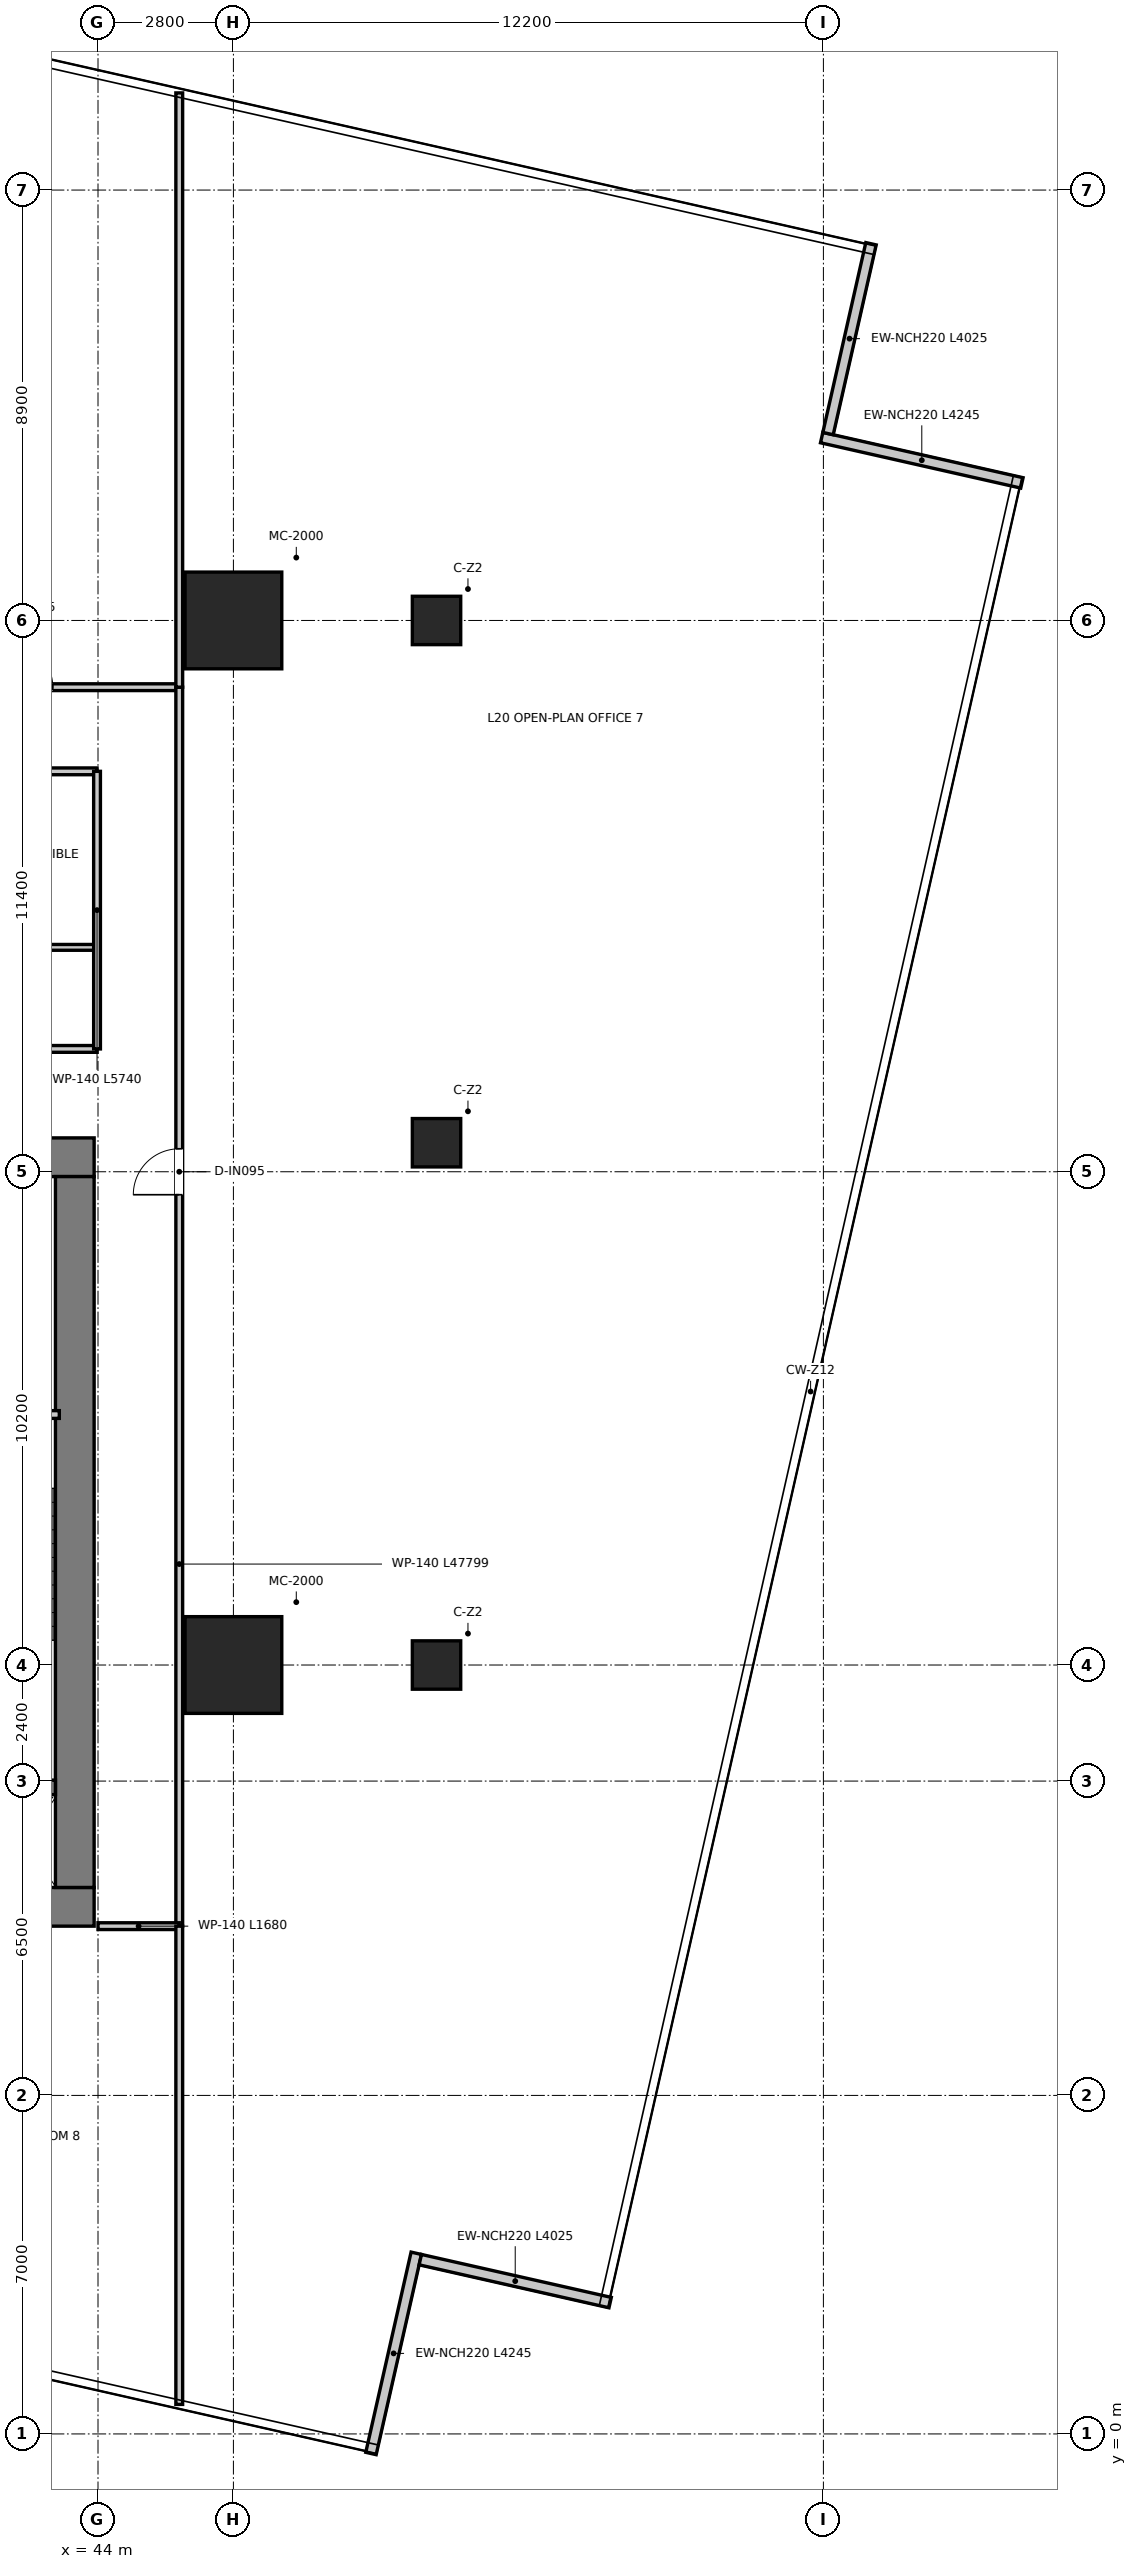
"""IFC4 building model, lengths in metres.
Left out: names, types, materials, properties, quantities, classifications, styles, units other than length and angle.
Written with IfcOpenShell. Run it as: python <this file> out.ifc"""

import sys

from ifc_helpers import new_model, si_unit, direction, frame, frame_2d, origin, origin_2d, place, context, subcontext, project, spatial, rectangle, extrude, source, transform, mapped, element, fill, save


model = new_model("IFC4")
c1 = context("Model", 3, precision=1e-05, world=origin(), true_north=direction((0.0, 1.0)))
c2 = subcontext(c1, "Body", "Model", "MODEL_VIEW")
j1 = project(units=[si_unit("LENGTHUNIT", "METRE"), si_unit("PLANEANGLEUNIT", "RADIAN")], contexts=[c1])
p1 = place(None, origin())
s1 = spatial("IfcSite", under=j1, at=p1, CompositionType="ELEMENT")
p2 = place(p1, origin())
s2 = spatial("IfcBuilding", under=s1, at=p2, CompositionType="ELEMENT")
p3 = place(p2, frame((0.0, 0.0, 86.1)))
s3 = spatial("IfcBuildingStorey", under=s2, at=p3, CompositionType="ELEMENT", Elevation=86.1)
p4 = place(p3, frame((28.08, 10.9, 0.0), z_axis=(0.0, 0.0, 1.0), x_axis=(1.0, 0.0, 0.0)))
e1 = element("IfcWall", 1, at=p4, inside=s3, PredefinedType="SHEAR", context=c2, shape_type="SweptSolid", body=[
    extrude(rectangle(XDim=15.84, YDim=0.8, at=frame_2d((7.92, 0.0))), origin(), (0.0, 0.0, 1.0), 3.95),
])
p5 = place(p3, frame((28.08, 26.4, 0.0), z_axis=(0.0, 0.0, 1.0), x_axis=(1.0, 0.0, 0.0)))
e2 = element("IfcWall", 2, at=p5, inside=s3, PredefinedType="SHEAR", context=c2, shape_type="SweptSolid", body=[
    extrude(rectangle(XDim=15.84, YDim=0.8, at=frame_2d((7.92, 0.0))), origin(), (0.0, 0.0, 1.0), 3.95),
])
p6 = place(p5, frame((7.22, 0.0, 0.0)))
e3 = element("IfcOpeningElement", 3, at=p6, cuts=e2, PredefinedType="OPENING", context=c2, shape_type="SweptSolid", body=[
    extrude(rectangle(XDim=1.4, YDim=2.2, at=frame_2d((0.7, 1.1))), frame((0.0, 0.41, 0.0), z_axis=(0.0, -1.0, 0.0), x_axis=(1.0, 0.0, 0.0)), (0.0, 0.0, 1.0), 0.82),
])
p7 = place(p5, frame((1.775, 0.0, 0.0)))
e4 = element("IfcOpeningElement", 4, at=p7, cuts=e2, PredefinedType="OPENING", context=c2, shape_type="SweptSolid", body=[
    extrude(rectangle(XDim=1.05, YDim=2.1, at=frame_2d((0.525, 1.05))), frame((0.0, 0.41, 0.0), z_axis=(0.0, -1.0, 0.0), x_axis=(1.0, 0.0, 0.0)), (0.0, 0.0, 1.0), 0.82),
])
p8 = place(p5, frame((13.015, 0.0, 0.0)))
e5 = element("IfcOpeningElement", 5, at=p8, cuts=e2, PredefinedType="OPENING", context=c2, shape_type="SweptSolid", body=[
    extrude(rectangle(XDim=1.05, YDim=2.1, at=frame_2d((0.525, 1.05))), frame((0.0, 0.41, 0.0), z_axis=(0.0, -1.0, 0.0), x_axis=(1.0, 0.0, 0.0)), (0.0, 0.0, 1.0), 0.82),
])
p9 = place(p3, frame((43.52, 11.3, 0.0), z_axis=(0.0, 0.0, 1.0), x_axis=(0.0, 1.0, 0.0)))
e6 = element("IfcWall", 6, at=p9, inside=s3, PredefinedType="SHEAR", context=c2, shape_type="SweptSolid", body=[
    extrude(rectangle(XDim=14.7, YDim=0.8, at=frame_2d((7.35, 0.0))), origin(), (0.0, 0.0, 1.0), 3.95),
])
p10 = place(p3, frame((40.02, 13.37, 0.0), z_axis=(0.0, 0.0, 1.0), x_axis=(1.0, 0.0, 0.0)))
e7 = element("IfcWall", 7, at=p10, inside=s3, PredefinedType="SHEAR", context=c2, shape_type="SweptSolid", body=[
    extrude(rectangle(XDim=3.1, YDim=0.3, at=frame_2d((1.55, 0.0))), origin(), (0.0, 0.0, 1.0), 3.95),
])
m1 = source(origin(), c2, "Body", "SweptSolid", [
    extrude(rectangle(XDim=2.0, YDim=2.0, at=origin_2d()), origin(), (0.0, 0.0, 1.0), 3.95),
])
for number, where, z_axis, x_axis in (
    (8, (46.8, 15.9, 0.0), (0.0, 0.0, 1.0), (1.0, 0.0, 0.0)),
    (9, (46.8, 37.5, 0.0), (0.0, 0.0, 1.0), (1.0, 0.0, 0.0)),
):
    element("IfcColumn", number, at=place(p3, frame(where, z_axis=z_axis, x_axis=x_axis)), inside=s3, PredefinedType="USERDEFINED", context=c2, shape_type="MappedRepresentation", body=[
        mapped(m1, transform((0.0, 0.0, 0.0), x_axis=(1.0, 0.0, 0.0), y_axis=(0.0, 1.0, 0.0), z_axis=(0.0, 0.0, 1.0), scale=1.0)),
    ])
m2 = source(origin(), c2, "Body", "SweptSolid", [
    extrude(rectangle(XDim=1.0, YDim=1.0, at=origin_2d()), origin(), (0.0, 0.0, 1.0), 3.95),
])
for number, where, z_axis, x_axis in (
    (10, (51.0, 37.5, 0.0), (0.0, 0.0, 1.0), (1.0, 0.0, 0.0)),
    (11, (51.0, 26.7, 0.0), (0.0, 0.0, 1.0), (1.0, 0.0, 0.0)),
    (12, (51.0, 15.9, 0.0), (0.0, 0.0, 1.0), (1.0, 0.0, 0.0)),
):
    element("IfcColumn", number, at=place(p3, frame(where, z_axis=z_axis, x_axis=x_axis)), inside=s3, PredefinedType="COLUMN", context=c2, shape_type="MappedRepresentation", body=[
        mapped(m2, transform((0.0, 0.0, 0.0), x_axis=(1.0, 0.0, 0.0), y_axis=(0.0, 1.0, 0.0), z_axis=(0.0, 0.0, 1.0), scale=1.0)),
    ])
p11 = place(p3, frame((49.645, -0.405, 0.0), z_axis=(0.0, 0.0, 1.0), x_axis=(0.220686293035, 0.975344841616, 0.0)))
e13 = element("IfcWall", 13, at=p11, inside=s3, PredefinedType="ELEMENTEDWALL", context=c2, shape_type="SweptSolid", body=[
    extrude(rectangle(XDim=4.245, YDim=0.22, at=frame_2d((2.123, 0.0))), origin(), (0.0, 0.0, 1.0), 3.67),
])
p12 = place(p3, frame((50.664, 3.604, 0.0), z_axis=(0.0, 0.0, 1.0), x_axis=(0.975349272951, -0.2206667074, 0.0)))
e14 = element("IfcWall", 14, at=p12, inside=s3, PredefinedType="ELEMENTEDWALL", context=c2, shape_type="SweptSolid", body=[
    extrude(rectangle(XDim=4.025, YDim=0.22, at=frame_2d((2.012, 0.0))), origin(), (0.0, 0.0, 1.0), 3.67),
])
p13 = place(p3, frame((63.105, 40.344, 0.0), z_axis=(0.0, 0.0, 1.0), x_axis=(-0.975335262593, 0.220728624202, 0.0)))
e15 = element("IfcWall", 15, at=p13, inside=s3, PredefinedType="ELEMENTEDWALL", context=c2, shape_type="SweptSolid", body=[
    extrude(rectangle(XDim=4.245, YDim=0.22, at=frame_2d((2.123, 0.0))), origin(), (0.0, 0.0, 1.0), 3.67),
])
p14 = place(p3, frame((59.096, 41.365, 0.0), z_axis=(0.0, 0.0, 1.0), x_axis=(0.220679762979, 0.975346319115, 0.0)))
e16 = element("IfcWall", 16, at=p14, inside=s3, PredefinedType="ELEMENTEDWALL", context=c2, shape_type="SweptSolid", body=[
    extrude(rectangle(XDim=4.025, YDim=0.22, at=frame_2d((2.012, 0.0))), origin(), (0.0, 0.0, 1.0), 3.67),
])
p15 = place(p3, frame((40.04, 21.08, 0.0), z_axis=(0.0, 0.0, 1.0), x_axis=(1.0, 0.0, 0.0)))
e17 = element("IfcWall", 17, at=p15, inside=s3, PredefinedType="PARTITIONING", context=c2, shape_type="SweptSolid", body=[
    extrude(rectangle(XDim=3.16, YDim=0.16, at=frame_2d((1.58, 0.0))), origin(), (0.0, 0.0, 1.0), 3.67),
])
p16 = place(p15, frame((1.055, 0.0, 0.0)))
e18 = element("IfcOpeningElement", 18, at=p16, cuts=e17, PredefinedType="OPENING", context=c2, shape_type="SweptSolid", body=[
    extrude(rectangle(XDim=1.05, YDim=2.1, at=frame_2d((0.525, 1.05))), frame((0.0, 0.09, 0.0), z_axis=(0.0, -1.0, 0.0), x_axis=(1.0, 0.0, 0.0)), (0.0, 0.0, 1.0), 0.18),
])
p17 = place(p3, frame((28.02, 28.64, 0.0), z_axis=(0.0, 0.0, 1.0), x_axis=(1.0, 0.0, 0.0)))
e19 = element("IfcWall", 19, at=p17, inside=s3, PredefinedType="PARTITIONING", context=c2, shape_type="SweptSolid", body=[
    extrude(rectangle(XDim=15.96, YDim=0.14, at=frame_2d((7.98, 0.0))), origin(), (0.0, 0.0, 1.0), 3.08),
])
p18 = place(p17, frame((7.455, 0.0, 0.0)))
e20 = element("IfcOpeningElement", 20, at=p18, cuts=e19, PredefinedType="OPENING", context=c2, shape_type="SweptSolid", body=[
    extrude(rectangle(XDim=1.05, YDim=2.15, at=frame_2d((0.525, 1.075))), frame((0.0, 0.08, 0.0), z_axis=(0.0, -1.0, 0.0), x_axis=(1.0, 0.0, 0.0)), (0.0, 0.0, 1.0), 0.16),
])
p19 = place(p3, frame((28.02, 30.74, 0.0), z_axis=(0.0, 0.0, 1.0), x_axis=(1.0, 0.0, 0.0)))
e21 = element("IfcWall", 21, at=p19, inside=s3, PredefinedType="PARTITIONING", context=c2, shape_type="SweptSolid", body=[
    extrude(rectangle(XDim=15.96, YDim=0.12, at=frame_2d((7.98, 0.0))), origin(), (0.0, 0.0, 1.0), 3.08),
])
p20 = place(p3, frame((28.02, 34.38, 0.0), z_axis=(0.0, 0.0, 1.0), x_axis=(1.0, 0.0, 0.0)))
e22 = element("IfcWall", 22, at=p20, inside=s3, PredefinedType="PARTITIONING", context=c2, shape_type="SweptSolid", body=[
    extrude(rectangle(XDim=15.96, YDim=0.14, at=frame_2d((7.98, 0.0))), origin(), (0.0, 0.0, 1.0), 3.08),
])
p21 = place(p20, frame((7.83, 0.0, 0.0)))
e23 = element("IfcOpeningElement", 23, at=p21, cuts=e22, PredefinedType="OPENING", context=c2, shape_type="SweptSolid", body=[
    extrude(rectangle(XDim=0.9, YDim=2.1, at=frame_2d((0.45, 1.05))), frame((0.0, 0.08, 0.0), z_axis=(0.0, -1.0, 0.0), x_axis=(1.0, 0.0, 0.0)), (0.0, 0.0, 1.0), 0.16),
])
p22 = place(p20, frame((11.03, 0.0, 0.0)))
e24 = element("IfcOpeningElement", 24, at=p22, cuts=e22, PredefinedType="OPENING", context=c2, shape_type="SweptSolid", body=[
    extrude(rectangle(XDim=0.9, YDim=2.1, at=frame_2d((0.45, 1.05))), frame((0.0, 0.08, 0.0), z_axis=(0.0, -1.0, 0.0), x_axis=(1.0, 0.0, 0.0)), (0.0, 0.0, 1.0), 0.16),
])
p23 = place(p20, frame((14.055, 0.0, 0.0)))
e25 = element("IfcOpeningElement", 25, at=p23, cuts=e22, PredefinedType="OPENING", context=c2, shape_type="SweptSolid", body=[
    extrude(rectangle(XDim=0.95, YDim=2.1, at=frame_2d((0.475, 1.05))), frame((0.0, 0.08, 0.0), z_axis=(0.0, -1.0, 0.0), x_axis=(1.0, 0.0, 0.0)), (0.0, 0.0, 1.0), 0.16),
])
p24 = place(p20, frame((2.855, 0.0, 0.0)))
e26 = element("IfcOpeningElement", 26, at=p24, cuts=e22, PredefinedType="OPENING", context=c2, shape_type="SweptSolid", body=[
    extrude(rectangle(XDim=0.95, YDim=2.1, at=frame_2d((0.475, 1.05))), frame((0.0, 0.08, 0.0), z_axis=(0.0, -1.0, 0.0), x_axis=(1.0, 0.0, 0.0)), (0.0, 0.0, 1.0), 0.16),
])
p25 = place(p3, frame((43.98, 28.64, 0.0), z_axis=(0.0, 0.0, 1.0), x_axis=(0.0, 1.0, 0.0)))
e27 = element("IfcWall", 27, at=p25, inside=s3, PredefinedType="PARTITIONING", context=c2, shape_type="SweptSolid", body=[
    extrude(rectangle(XDim=5.74, YDim=0.14, at=frame_2d((2.87, 0.0))), origin(), (0.0, 0.0, 1.0), 3.27),
])
p26 = place(p3, frame((26.32, 36.12, 0.0), z_axis=(0.0, 0.0, 1.0), x_axis=(1.0, 0.0, 0.0)))
e28 = element("IfcWall", 28, at=p26, inside=s3, PredefinedType="PARTITIONING", context=c2, shape_type="SweptSolid", body=[
    extrude(rectangle(XDim=19.36, YDim=0.14, at=frame_2d((9.68, 0.0))), origin(), (0.0, 0.0, 1.0), 3.08),
])
p27 = place(p26, frame((2.115, 0.0, 0.0)))
e29 = element("IfcOpeningElement", 29, at=p27, cuts=e28, PredefinedType="OPENING", context=c2, shape_type="SweptSolid", body=[
    extrude(rectangle(XDim=0.95, YDim=2.1, at=frame_2d((0.475, 1.05))), frame((0.0, 0.08, 0.0), z_axis=(0.0, -1.0, 0.0), x_axis=(1.0, 0.0, 0.0)), (0.0, 0.0, 1.0), 0.16),
])
p28 = place(p26, frame((8.705, 0.0, 0.0)))
e30 = element("IfcOpeningElement", 30, at=p28, cuts=e28, PredefinedType="OPENING", context=c2, shape_type="SweptSolid", body=[
    extrude(rectangle(XDim=0.95, YDim=2.1, at=frame_2d((0.475, 1.05))), frame((0.0, 0.08, 0.0), z_axis=(0.0, -1.0, 0.0), x_axis=(1.0, 0.0, 0.0)), (0.0, 0.0, 1.0), 0.16),
])
p29 = place(p26, frame((15.795, 0.0, 0.0)))
e31 = element("IfcOpeningElement", 31, at=p29, cuts=e28, PredefinedType="OPENING", context=c2, shape_type="SweptSolid", body=[
    extrude(rectangle(XDim=0.95, YDim=2.1, at=frame_2d((0.475, 1.05))), frame((0.0, 0.08, 0.0), z_axis=(0.0, -1.0, 0.0), x_axis=(1.0, 0.0, 0.0)), (0.0, 0.0, 1.0), 0.16),
])
p30 = place(p3, frame((45.68, 10.5, 0.0), z_axis=(0.0, 0.0, 1.0), x_axis=(0.0, 1.0, 0.0)))
e32 = element("IfcWall", 32, at=p30, inside=s3, PredefinedType="PARTITIONING", context=c2, shape_type="SweptSolid", body=[
    extrude(rectangle(XDim=25.62, YDim=0.14, at=frame_2d((12.81, 0.0))), origin(), (0.0, 0.0, 1.0), 2.97),
])
p31 = place(p30, frame((15.125, 0.0, 0.0)))
e33 = element("IfcOpeningElement", 33, at=p31, cuts=e32, PredefinedType="OPENING", context=c2, shape_type="SweptSolid", body=[
    extrude(rectangle(XDim=0.95, YDim=2.1, at=frame_2d((0.475, 1.05))), frame((0.0, 0.08, 0.0), z_axis=(0.0, -1.0, 0.0), x_axis=(1.0, 0.0, 0.0)), (0.0, 0.0, 1.0), 0.16),
])
p32 = place(p3, frame((44.0, 10.5, 0.0), z_axis=(0.0, 0.0, 1.0), x_axis=(1.0, 0.0, 0.0)))
e34 = element("IfcWall", 34, at=p32, inside=s3, PredefinedType="PARTITIONING", context=c2, shape_type="SweptSolid", body=[
    extrude(rectangle(XDim=1.68, YDim=0.14, at=frame_2d((0.84, 0.0))), origin(), (0.0, 0.0, 1.0), 3.67),
])
p33 = place(p3, frame((45.68, 36.12, 0.0), z_axis=(0.0, 0.0, 1.0), x_axis=(0.0, 1.0, 0.0)))
e35 = element("IfcWall", 35, at=p33, inside=s3, PredefinedType="PARTITIONING", context=c2, shape_type="SweptSolid", body=[
    extrude(rectangle(XDim=12.289, YDim=0.14, at=frame_2d((6.145, 0.0))), origin(), (0.0, 0.0, 1.0), 2.97),
])
p34 = place(p3, frame((45.68, 0.61, 0.0), z_axis=(0.0, 0.0, 1.0), x_axis=(0.0, 1.0, 0.0)))
e36 = element("IfcWall", 36, at=p34, inside=s3, PredefinedType="PARTITIONING", context=c2, shape_type="SweptSolid", body=[
    extrude(rectangle(XDim=9.89, YDim=0.14, at=frame_2d((4.945, 0.0))), origin(), (0.0, 0.0, 1.0), 3.67),
])
p35 = place(p29, origin())
e37 = element("IfcDoor", 37, at=p35, inside=s3, OperationType="SINGLE_SWING_LEFT", PredefinedType="DOOR", context=c2, shape_type="SweptSolid", body=[
    extrude(rectangle(XDim=0.95, YDim=2.1, at=frame_2d((0.475, 1.05))), frame((0.0, 0.025, 0.0), z_axis=(0.0, -1.0, 0.0), x_axis=(1.0, 0.0, 0.0)), (0.0, 0.0, 1.0), 0.05),
])
fill(e31, e37)
p36 = place(p31, origin())
e38 = element("IfcDoor", 38, at=p36, inside=s3, OperationType="SINGLE_SWING_LEFT", PredefinedType="DOOR", context=c2, shape_type="SweptSolid", body=[
    extrude(rectangle(XDim=0.95, YDim=2.1, at=frame_2d((0.475, 1.05))), frame((0.0, 0.025, 0.0), z_axis=(0.0, -1.0, 0.0), x_axis=(1.0, 0.0, 0.0)), (0.0, 0.0, 1.0), 0.05),
])
fill(e33, e38)
save(model, sys.argv[1])
